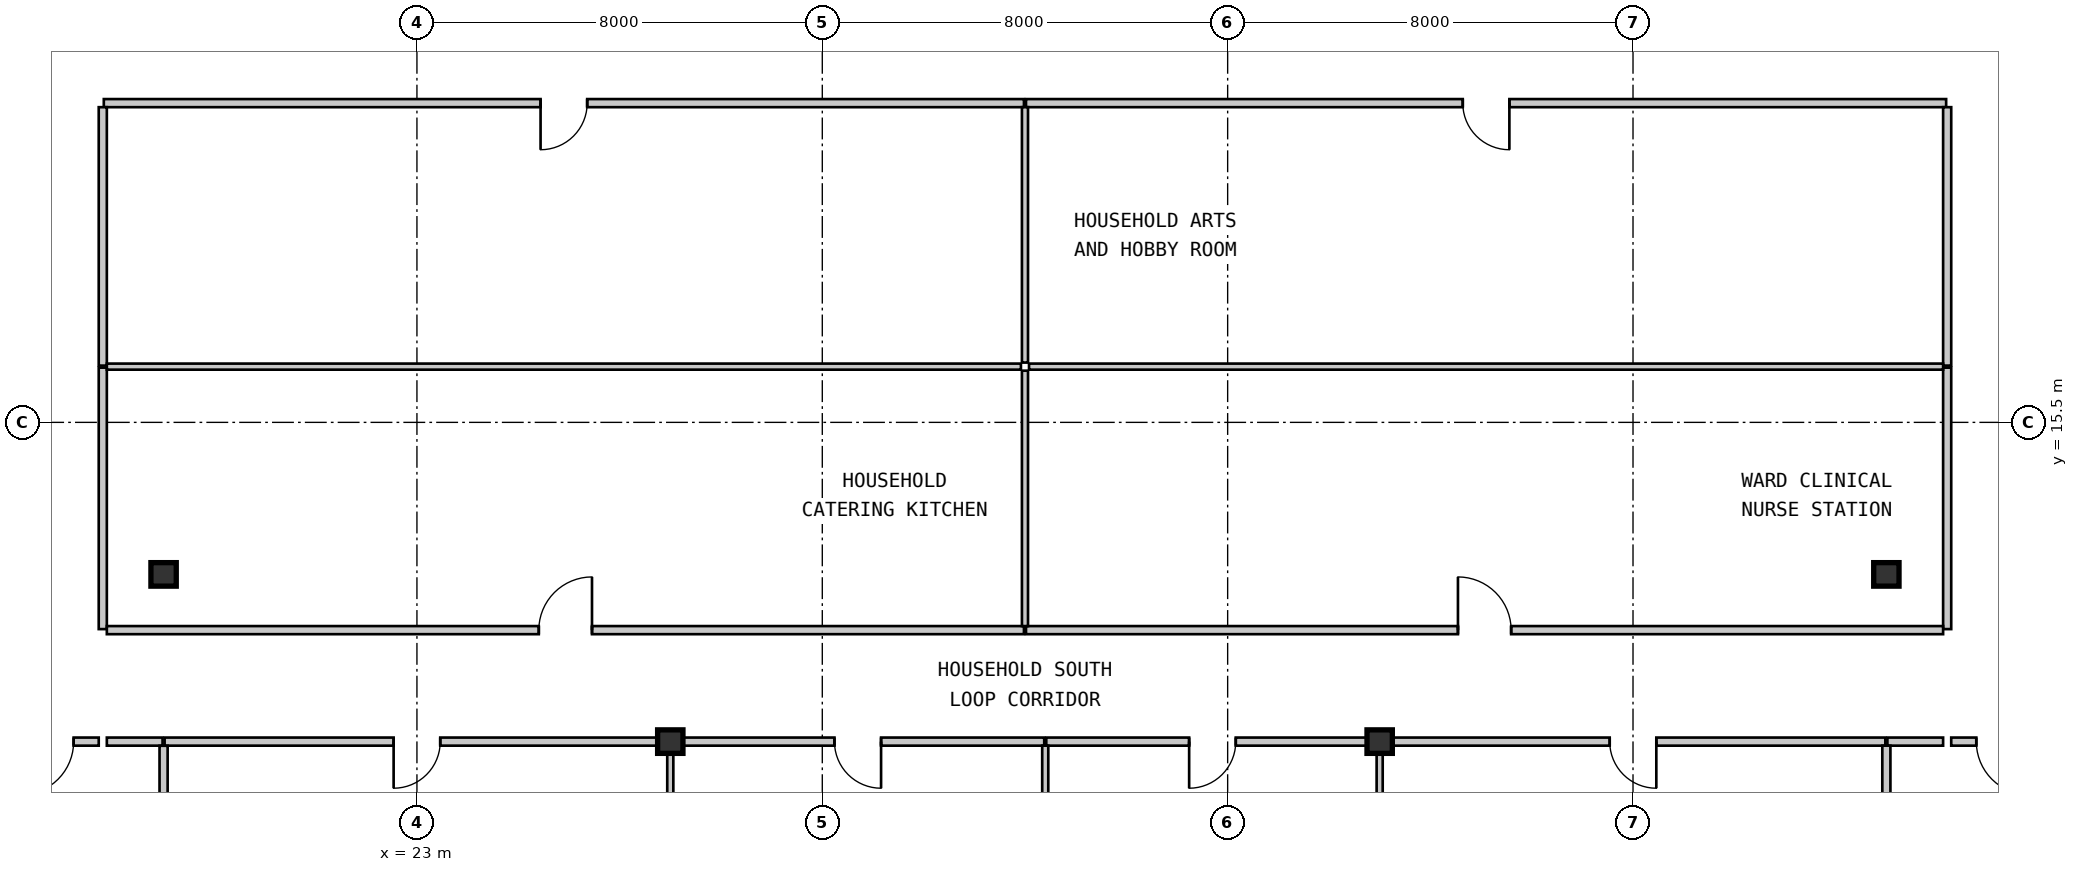
"""IFC4 building model, lengths in metres.
Left out: names, types, materials, properties, quantities, classifications, styles, units other than length and angle.
Written with IfcOpenShell. Run it as: python <this file> out.ifc"""

import sys

from ifc_helpers import new_model, si_unit, direction, frame, frame_2d, origin, origin_2d, place, context, subcontext, project, spatial, rectangle, i_section, extrude, source, transform, mapped, element, fill, save


model = new_model("IFC4")
c1 = context("Model", 3, precision=1e-05, world=origin(), true_north=direction((0.0, 1.0)))
c2 = subcontext(c1, "Body", "Model", "MODEL_VIEW")
j1 = project(units=[si_unit("LENGTHUNIT", "METRE"), si_unit("PLANEANGLEUNIT", "RADIAN")], contexts=[c1])
p1 = place(None, origin())
s1 = spatial("IfcSite", under=j1, at=p1, CompositionType="ELEMENT")
p2 = place(p1, origin())
s2 = spatial("IfcBuilding", under=s1, at=p2, CompositionType="ELEMENT")
p3 = place(p2, frame((0.0, 0.0, 74.55)))
s3 = spatial("IfcBuildingStorey", under=s2, at=p3, CompositionType="ELEMENT", Elevation=74.55)
m1 = source(origin(), c2, "Body", "SweptSolid", [
    extrude(i_section(OverallWidth=0.5, OverallDepth=0.464, WebThickness=0.022, FlangeThickness=0.034, at=origin_2d()), origin(), (0.0, 0.0, 1.0), 3.15),
])
for number, where, z_axis, x_axis in (
    (1, (28.0, 9.2, 0.0), (0.0, 0.0, 1.0), (1.0, 0.0, 0.0)),
    (2, (42.0, 9.2, 0.0), (0.0, 0.0, 1.0), (1.0, 0.0, 0.0)),
    (3, (18.0, 12.5, 0.0), (0.0, 0.0, 1.0), (1.0, 0.0, 0.0)),
    (4, (52.0, 12.5, 0.0), (0.0, 0.0, 1.0), (1.0, 0.0, 0.0)),
):
    element("IfcColumn", number, at=place(p3, frame(where, z_axis=z_axis, x_axis=x_axis)), inside=s3, PredefinedType="COLUMN", context=c2, shape_type="MappedRepresentation", body=[
        mapped(m1, transform((0.0, 0.0, 0.0), scale=1.0)),
    ])
m2 = source(origin(), c2, "Body", "SweptSolid", [
    extrude(rectangle(XDim=5.16, YDim=0.16, at=frame_2d((2.58, 0.0))), origin(), (0.0, 0.0, 1.0), 2.93),
])
p4 = place(p3, frame((16.8, 16.58, 0.0), z_axis=(0.0, 0.0, 1.0), x_axis=(0.0, -1.0, 0.0)))
e5 = element("IfcWall", 5, at=p4, inside=s3, PredefinedType="PARTITIONING", context=c2, shape_type="MappedRepresentation", body=[
    mapped(m2, transform((0.0, 0.0, 0.0), scale=1.0)),
])
m3 = source(origin(), c2, "Body", "SweptSolid", [
    extrude(rectangle(XDim=18.159, YDim=0.16, at=frame_2d((9.08, 0.0))), origin(), (0.0, 0.0, 1.0), 2.93),
])
p5 = place(p3, frame((34.98, 21.8, 0.0), z_axis=(0.0, 0.0, 1.0), x_axis=(-1.0, 0.0, 0.0)))
e6 = element("IfcWall", 6, at=p5, inside=s3, PredefinedType="PARTITIONING", context=c2, shape_type="MappedRepresentation", body=[
    mapped(m3, transform((0.0, 0.0, 0.0), scale=1.0)),
])
m4 = source(origin(), c2, "Body", "SweptSolid", [
    extrude(rectangle(XDim=0.92, YDim=2.1, at=frame_2d((0.46, 1.05))), frame((0.0, 0.09, 0.0), z_axis=(0.0, -1.0, 0.0), x_axis=(1.0, 0.0, 0.0)), (0.0, 0.0, 1.0), 0.18),
])
p6 = place(p5, frame((8.62, 0.0, 0.0)))
e7 = element("IfcOpeningElement", 7, at=p6, cuts=e6, PredefinedType="OPENING", context=c2, shape_type="MappedRepresentation", body=[
    mapped(m4, transform((0.0, 0.0, 0.0), scale=1.0)),
])
m5 = source(origin(), c2, "Body", "SweptSolid", [
    extrude(rectangle(XDim=5.1, YDim=0.16, at=frame_2d((2.55, 0.0))), origin(), (0.0, 0.0, 1.0), 2.93),
])
p7 = place(p3, frame((16.8, 21.72, 0.0), z_axis=(0.0, 0.0, 1.0), x_axis=(0.0, -1.0, 0.0)))
e8 = element("IfcWall", 8, at=p7, inside=s3, PredefinedType="PARTITIONING", context=c2, shape_type="MappedRepresentation", body=[
    mapped(m5, transform((0.0, 0.0, 0.0), scale=1.0)),
])
p8 = place(p3, frame((53.2, 11.42, 0.0), z_axis=(0.0, 0.0, 1.0), x_axis=(0.0, 1.0, 0.0)))
e9 = element("IfcWall", 9, at=p8, inside=s3, PredefinedType="PARTITIONING", context=c2, shape_type="MappedRepresentation", body=[
    mapped(m2, transform((0.0, 0.0, 0.0), scale=1.0)),
])
p9 = place(p3, frame((53.18, 21.8, 0.0), z_axis=(0.0, 0.0, 1.0), x_axis=(-1.0, 0.0, 0.0)))
e10 = element("IfcWall", 10, at=p9, inside=s3, PredefinedType="PARTITIONING", context=c2, shape_type="MappedRepresentation", body=[
    mapped(m3, transform((0.0, 0.0, 0.0), scale=1.0)),
])
p10 = place(p9, frame((8.62, 0.0, 0.0)))
e11 = element("IfcOpeningElement", 11, at=p10, cuts=e10, PredefinedType="OPENING", context=c2, shape_type="MappedRepresentation", body=[
    mapped(m4, transform((0.0, 0.0, 0.0), scale=1.0)),
])
p11 = place(p3, frame((53.2, 16.62, 0.0), z_axis=(0.0, 0.0, 1.0), x_axis=(0.0, 1.0, 0.0)))
e12 = element("IfcWall", 12, at=p11, inside=s3, PredefinedType="PARTITIONING", context=c2, shape_type="MappedRepresentation", body=[
    mapped(m5, transform((0.0, 0.0, 0.0), scale=1.0)),
])
m6 = source(origin(), c2, "Body", "SweptSolid", [
    extrude(rectangle(XDim=2.04, YDim=0.16, at=frame_2d((1.02, 0.0))), origin(), (0.0, 0.0, 1.0), 2.93),
])
p12 = place(p3, frame((16.72, 9.2, 0.0), z_axis=(0.0, 0.0, 1.0), x_axis=(-1.0, 0.0, 0.0)))
e13 = element("IfcWall", 13, at=p12, inside=s3, PredefinedType="PARTITIONING", context=c2, shape_type="MappedRepresentation", body=[
    mapped(m6, transform((0.0, 0.0, 0.0), scale=1.0)),
])
m7 = source(origin(), c2, "Body", "SweptSolid", [
    extrude(rectangle(XDim=1.05, YDim=2.1, at=frame_2d((0.525, 1.05))), frame((0.0, 0.09, 0.0), z_axis=(0.0, -1.0, 0.0), x_axis=(1.0, 0.0, 0.0)), (0.0, 0.0, 1.0), 0.18),
])
p13 = place(p12, frame((0.495, 0.0, 0.0)))
e14 = element("IfcOpeningElement", 14, at=p13, cuts=e13, PredefinedType="OPENING", context=c2, shape_type="MappedRepresentation", body=[
    mapped(m7, transform((0.0, 0.0, 0.0), scale=1.0)),
])
p14 = place(p3, frame((55.32, 9.2, 0.0), z_axis=(0.0, 0.0, 1.0), x_axis=(-1.0, 0.0, 0.0)))
e15 = element("IfcWall", 15, at=p14, inside=s3, PredefinedType="PARTITIONING", context=c2, shape_type="MappedRepresentation", body=[
    mapped(m6, transform((0.0, 0.0, 0.0), scale=1.0)),
])
p15 = place(p14, frame((0.495, 0.0, 0.0)))
e16 = element("IfcOpeningElement", 16, at=p15, cuts=e15, PredefinedType="OPENING", context=c2, shape_type="MappedRepresentation", body=[
    mapped(m7, transform((0.0, 0.0, 0.0), scale=1.0)),
])
m8 = source(origin(), c2, "Body", "SweptSolid", [
    extrude(rectangle(XDim=18.1, YDim=0.16, at=frame_2d((9.05, 0.0))), origin(), (0.0, 0.0, 1.0), 2.93),
])
p16 = place(p3, frame((16.88, 11.4, 0.0), z_axis=(0.0, 0.0, 1.0), x_axis=(1.0, 0.0, 0.0)))
e17 = element("IfcWall", 17, at=p16, inside=s3, PredefinedType="PARTITIONING", context=c2, shape_type="MappedRepresentation", body=[
    mapped(m8, transform((0.0, 0.0, 0.0), scale=1.0)),
])
p17 = place(p16, frame((8.525, 0.0, 0.0)))
e18 = element("IfcOpeningElement", 18, at=p17, cuts=e17, PredefinedType="OPENING", context=c2, shape_type="MappedRepresentation", body=[
    mapped(m7, transform((0.0, 0.0, 0.0), scale=1.0)),
])
p18 = place(p3, frame((35.02, 11.4, 0.0), z_axis=(0.0, 0.0, 1.0), x_axis=(1.0, 0.0, 0.0)))
e19 = element("IfcWall", 19, at=p18, inside=s3, PredefinedType="PARTITIONING", context=c2, shape_type="MappedRepresentation", body=[
    mapped(m8, transform((0.0, 0.0, 0.0), scale=1.0)),
])
p19 = place(p18, frame((8.525, 0.0, 0.0)))
e20 = element("IfcOpeningElement", 20, at=p19, cuts=e19, PredefinedType="OPENING", context=c2, shape_type="MappedRepresentation", body=[
    mapped(m7, transform((0.0, 0.0, 0.0), scale=1.0)),
])
m9 = source(origin(), c2, "Body", "SweptSolid", [
    extrude(rectangle(XDim=1.1, YDim=0.16, at=frame_2d((0.55, 0.0))), origin(), (0.0, 0.0, 1.0), 2.93),
])
p20 = place(p3, frame((17.98, 9.2, 0.0), z_axis=(0.0, 0.0, 1.0), x_axis=(-1.0, 0.0, 0.0)))
e21 = element("IfcWall", 21, at=p20, inside=s3, PredefinedType="PARTITIONING", context=c2, shape_type="MappedRepresentation", body=[
    mapped(m9, transform((0.0, 0.0, 0.0), scale=1.0)),
])
m10 = source(origin(), c2, "Body", "SweptSolid", [
    extrude(rectangle(XDim=9.959, YDim=0.16, at=frame_2d((4.98, 0.0))), origin(), (0.0, 0.0, 1.0), 2.93),
])
p21 = place(p3, frame((27.98, 9.2, 0.0), z_axis=(0.0, 0.0, 1.0), x_axis=(-1.0, 0.0, 0.0)))
e22 = element("IfcWall", 22, at=p21, inside=s3, PredefinedType="PARTITIONING", context=c2, shape_type="MappedRepresentation", body=[
    mapped(m10, transform((0.0, 0.0, 0.0), scale=1.0)),
])
p22 = place(p21, frame((4.52, 0.0, 0.0)))
e23 = element("IfcOpeningElement", 23, at=p22, cuts=e22, PredefinedType="OPENING", context=c2, shape_type="MappedRepresentation", body=[
    mapped(m4, transform((0.0, 0.0, 0.0), scale=1.0)),
])
m11 = source(origin(), c2, "Body", "SweptSolid", [
    extrude(rectangle(XDim=7.36, YDim=0.16, at=frame_2d((3.68, 0.0))), origin(), (0.0, 0.0, 1.0), 2.328),
])
p23 = place(p3, frame((35.38, 9.2, 0.0), z_axis=(0.0, 0.0, 1.0), x_axis=(-1.0, 0.0, 0.0)))
e24 = element("IfcWall", 24, at=p23, inside=s3, PredefinedType="PARTITIONING", context=c2, shape_type="MappedRepresentation", body=[
    mapped(m11, transform((0.0, 0.0, 0.0), scale=1.0)),
])
p24 = place(p23, frame((3.22, 0.0, 0.0)))
e25 = element("IfcOpeningElement", 25, at=p24, cuts=e24, PredefinedType="OPENING", context=c2, shape_type="MappedRepresentation", body=[
    mapped(m4, transform((0.0, 0.0, 0.0), scale=1.0)),
])
m12 = source(origin(), c2, "Body", "SweptSolid", [
    extrude(rectangle(XDim=6.56, YDim=0.16, at=frame_2d((3.28, 0.0))), origin(), (0.0, 0.0, 1.0), 2.328),
])
p25 = place(p3, frame((41.98, 9.2, 0.0), z_axis=(0.0, 0.0, 1.0), x_axis=(-1.0, 0.0, 0.0)))
e26 = element("IfcWall", 26, at=p25, inside=s3, PredefinedType="PARTITIONING", context=c2, shape_type="MappedRepresentation", body=[
    mapped(m12, transform((0.0, 0.0, 0.0), scale=1.0)),
])
p26 = place(p25, frame((2.82, 0.0, 0.0)))
e27 = element("IfcOpeningElement", 27, at=p26, cuts=e26, PredefinedType="OPENING", context=c2, shape_type="MappedRepresentation", body=[
    mapped(m4, transform((0.0, 0.0, 0.0), scale=1.0)),
])
p27 = place(p3, frame((51.98, 9.2, 0.0), z_axis=(0.0, 0.0, 1.0), x_axis=(-1.0, 0.0, 0.0)))
e28 = element("IfcWall", 28, at=p27, inside=s3, PredefinedType="PARTITIONING", context=c2, shape_type="MappedRepresentation", body=[
    mapped(m10, transform((0.0, 0.0, 0.0), scale=1.0)),
])
p28 = place(p27, frame((4.52, 0.0, 0.0)))
e29 = element("IfcOpeningElement", 29, at=p28, cuts=e28, PredefinedType="OPENING", context=c2, shape_type="MappedRepresentation", body=[
    mapped(m4, transform((0.0, 0.0, 0.0), scale=1.0)),
])
p29 = place(p3, frame((53.12, 9.2, 0.0), z_axis=(0.0, 0.0, 1.0), x_axis=(-1.0, 0.0, 0.0)))
e30 = element("IfcWall", 30, at=p29, inside=s3, PredefinedType="PARTITIONING", context=c2, shape_type="MappedRepresentation", body=[
    mapped(m9, transform((0.0, 0.0, 0.0), scale=1.0)),
])
m13 = source(origin(), c2, "Body", "SweptSolid", [
    extrude(rectangle(XDim=18.04, YDim=0.12, at=frame_2d((9.02, 0.0))), origin(), (0.0, 0.0, 1.0), 2.93),
])
p30 = place(p3, frame((16.88, 16.6, 0.0), z_axis=(0.0, 0.0, 1.0), x_axis=(1.0, 0.0, 0.0)))
e31 = element("IfcWall", 31, at=p30, inside=s3, PredefinedType="PARTITIONING", context=c2, shape_type="MappedRepresentation", body=[
    mapped(m13, transform((0.0, 0.0, 0.0), scale=1.0)),
])
m14 = source(origin(), c2, "Body", "SweptSolid", [
    extrude(rectangle(XDim=5.04, YDim=0.12, at=frame_2d((2.52, 0.0))), origin(), (0.0, 0.0, 1.0), 2.93),
])
for number, where, z_axis, x_axis in (
    (32, (35.0, 16.52, 0.0), (0.0, 0.0, 1.0), (0.0, -1.0, 0.0)),
    (33, (35.0, 21.72, 0.0), (0.0, 0.0, 1.0), (0.0, -1.0, 0.0)),
):
    element("IfcWall", number, at=place(p3, frame(where, z_axis=z_axis, x_axis=x_axis)), inside=s3, PredefinedType="PARTITIONING", context=c2, shape_type="MappedRepresentation", body=[
        mapped(m14, transform((0.0, 0.0, 0.0), scale=1.0)),
    ])
p31 = place(p3, frame((35.08, 16.6, 0.0), z_axis=(0.0, 0.0, 1.0), x_axis=(1.0, 0.0, 0.0)))
e34 = element("IfcWall", 34, at=p31, inside=s3, PredefinedType="PARTITIONING", context=c2, shape_type="MappedRepresentation", body=[
    mapped(m13, transform((0.0, 0.0, 0.0), scale=1.0)),
])
m15 = source(origin(), c2, "Body", "SweptSolid", [
    extrude(rectangle(XDim=9.325, YDim=0.16, at=frame_2d((4.663, 0.0))), origin(), (0.0, 0.0, 1.0), 2.93),
])
p32 = place(p3, frame((18.0, 9.118, 0.0), z_axis=(0.0, 0.0, 1.0), x_axis=(0.0, -1.0, 0.0)))
e35 = element("IfcWall", 35, at=p32, inside=s3, PredefinedType="PARTITIONING", context=c2, shape_type="MappedRepresentation", body=[
    mapped(m15, transform((0.0, 0.0, 0.0), scale=1.0)),
])
m16 = source(origin(), c2, "Body", "SweptSolid", [
    extrude(rectangle(XDim=8.349, YDim=0.12, at=frame_2d((4.174, 0.0))), origin(), (0.0, 0.0, 1.0), 2.93),
])
p33 = place(p3, frame((28.0, 9.12, 0.0), z_axis=(0.0, 0.0, 1.0), x_axis=(0.0, -1.0, 0.0)))
e36 = element("IfcWall", 36, at=p33, inside=s3, PredefinedType="PARTITIONING", context=c2, shape_type="MappedRepresentation", body=[
    mapped(m16, transform((0.0, 0.0, 0.0), scale=1.0)),
])
m17 = source(origin(), c2, "Body", "SweptSolid", [
    extrude(rectangle(XDim=7.623, YDim=0.12, at=frame_2d((3.812, 0.0))), origin(), (0.0, 0.0, 1.0), 2.93),
])
p34 = place(p3, frame((35.4, 9.12, 0.0), z_axis=(0.0, 0.0, 1.0), x_axis=(0.0, -1.0, 0.0)))
e37 = element("IfcWall", 37, at=p34, inside=s3, PredefinedType="PARTITIONING", context=c2, shape_type="MappedRepresentation", body=[
    mapped(m17, transform((0.0, 0.0, 0.0), scale=1.0)),
])
m18 = source(origin(), c2, "Body", "SweptSolid", [
    extrude(rectangle(XDim=6.976, YDim=0.12, at=frame_2d((3.488, 0.0))), origin(), (0.0, 0.0, 1.0), 2.93),
])
p35 = place(p3, frame((42.0, 9.12, 0.0), z_axis=(0.0, 0.0, 1.0), x_axis=(0.0, -1.0, 0.0)))
e38 = element("IfcWall", 38, at=p35, inside=s3, PredefinedType="PARTITIONING", context=c2, shape_type="MappedRepresentation", body=[
    mapped(m18, transform((0.0, 0.0, 0.0), scale=1.0)),
])
m19 = source(origin(), c2, "Body", "SweptSolid", [
    extrude(rectangle(XDim=3.59, YDim=0.16, at=frame_2d((1.795, 0.0))), origin(), (0.0, 0.0, 1.0), 2.93),
])
p36 = place(p3, frame((52.0, 9.12, 0.0), z_axis=(0.0, 0.0, 1.0), x_axis=(0.0, -1.0, 0.0)))
e39 = element("IfcWall", 39, at=p36, inside=s3, PredefinedType="PARTITIONING", context=c2, shape_type="MappedRepresentation", body=[
    mapped(m19, transform((0.0, 0.0, 0.0), scale=1.0)),
])
m20 = source(origin(), c2, "Body", "SweptSolid", [
    extrude(rectangle(XDim=0.92, YDim=2.1, at=frame_2d((0.46, 1.05))), frame((0.0, 0.025, 0.0), z_axis=(0.0, -1.0, 0.0), x_axis=(1.0, 0.0, 0.0)), (0.0, 0.0, 1.0), 0.05),
])
p37 = place(p6, origin())
e40 = element("IfcDoor", 40, at=p37, inside=s3, OperationType="SINGLE_SWING_RIGHT", PredefinedType="DOOR", context=c2, shape_type="MappedRepresentation", body=[
    mapped(m20, transform((0.0, 0.0, 0.0), scale=1.0)),
])
fill(e7, e40)
p38 = place(p10, origin())
e41 = element("IfcDoor", 41, at=p38, inside=s3, OperationType="SINGLE_SWING_LEFT", PredefinedType="DOOR", context=c2, shape_type="MappedRepresentation", body=[
    mapped(m20, transform((0.0, 0.0, 0.0), scale=1.0)),
])
fill(e11, e41)
m21 = source(origin(), c2, "Body", "SweptSolid", [
    extrude(rectangle(XDim=1.05, YDim=2.1, at=frame_2d((0.525, 1.05))), frame((0.0, 0.025, 0.0), z_axis=(0.0, -1.0, 0.0), x_axis=(1.0, 0.0, 0.0)), (0.0, 0.0, 1.0), 0.05),
])
p39 = place(p13, origin())
e42 = element("IfcDoor", 42, at=p39, inside=s3, OperationType="SINGLE_SWING_RIGHT", PredefinedType="DOOR", context=c2, shape_type="MappedRepresentation", body=[
    mapped(m21, transform((0.0, 0.0, 0.0), scale=1.0)),
])
fill(e14, e42)
p40 = place(p15, origin())
e43 = element("IfcDoor", 43, at=p40, inside=s3, OperationType="SINGLE_SWING_LEFT", PredefinedType="DOOR", context=c2, shape_type="MappedRepresentation", body=[
    mapped(m21, transform((0.0, 0.0, 0.0), scale=1.0)),
])
fill(e16, e43)
p41 = place(p17, origin())
e44 = element("IfcDoor", 44, at=p41, inside=s3, OperationType="SINGLE_SWING_RIGHT", PredefinedType="DOOR", context=c2, shape_type="MappedRepresentation", body=[
    mapped(m21, transform((0.0, 0.0, 0.0), scale=1.0)),
])
fill(e18, e44)
p42 = place(p19, origin())
e45 = element("IfcDoor", 45, at=p42, inside=s3, OperationType="SINGLE_SWING_LEFT", PredefinedType="DOOR", context=c2, shape_type="MappedRepresentation", body=[
    mapped(m21, transform((0.0, 0.0, 0.0), scale=1.0)),
])
fill(e20, e45)
p43 = place(p22, origin())
e46 = element("IfcDoor", 46, at=p43, inside=s3, OperationType="SINGLE_SWING_RIGHT", PredefinedType="DOOR", context=c2, shape_type="MappedRepresentation", body=[
    mapped(m20, transform((0.0, 0.0, 0.0), scale=1.0)),
])
fill(e23, e46)
p44 = place(p24, origin())
e47 = element("IfcDoor", 47, at=p44, inside=s3, OperationType="SINGLE_SWING_LEFT", PredefinedType="DOOR", context=c2, shape_type="MappedRepresentation", body=[
    mapped(m20, transform((0.0, 0.0, 0.0), scale=1.0)),
])
fill(e25, e47)
p45 = place(p26, origin())
e48 = element("IfcDoor", 48, at=p45, inside=s3, OperationType="SINGLE_SWING_RIGHT", PredefinedType="DOOR", context=c2, shape_type="MappedRepresentation", body=[
    mapped(m20, transform((0.0, 0.0, 0.0), scale=1.0)),
])
fill(e27, e48)
p46 = place(p28, origin())
e49 = element("IfcDoor", 49, at=p46, inside=s3, OperationType="SINGLE_SWING_LEFT", PredefinedType="DOOR", context=c2, shape_type="MappedRepresentation", body=[
    mapped(m20, transform((0.0, 0.0, 0.0), scale=1.0)),
])
fill(e29, e49)
save(model, sys.argv[1])
